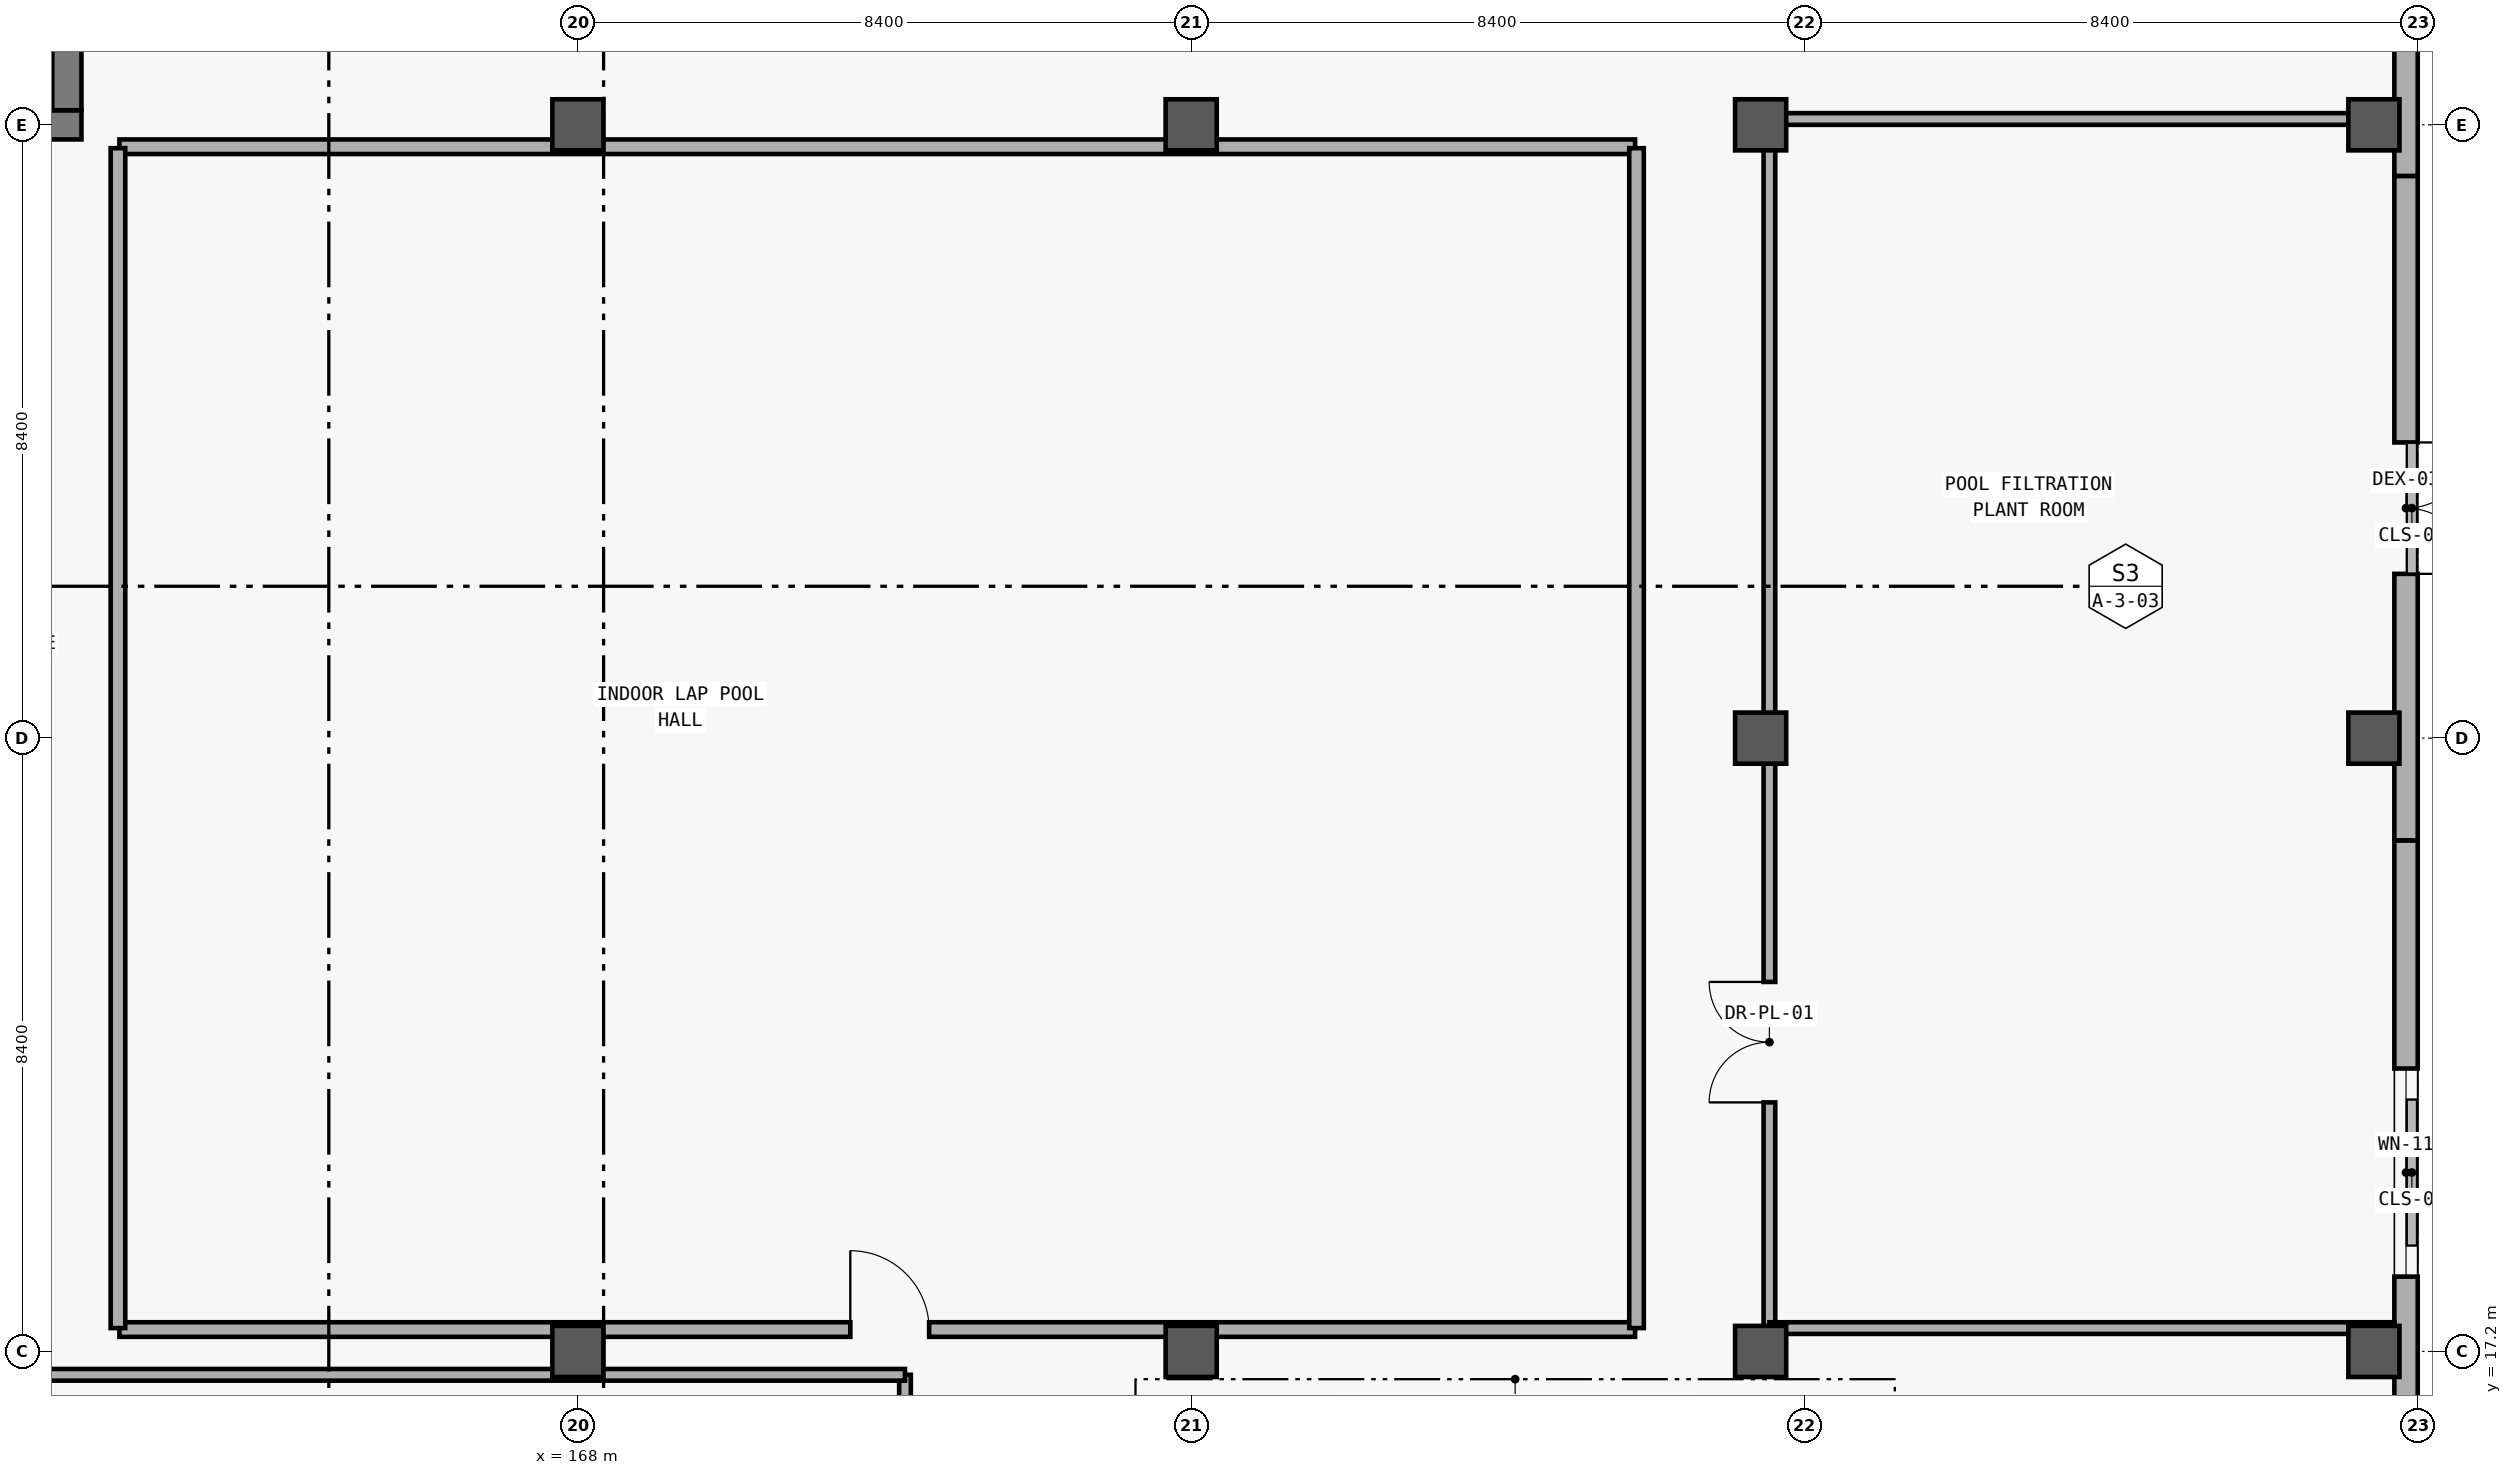
"""IFC4 building model, lengths in metres.
Left out: names, types, materials, properties, quantities, classifications, styles, units other than length and angle.
Written with IfcOpenShell. Run it as: python <this file> out.ifc"""

import sys

from ifc_helpers import new_model, si_unit, direction, frame, frame_2d, origin, origin_2d, place, context, subcontext, project, spatial, rectangle, extrude, element, fill, save


model = new_model("IFC4")
c1 = context("Model", 3, precision=1e-05, world=origin(), true_north=direction((0.0, 1.0)))
c2 = subcontext(c1, "Body", "Model", "MODEL_VIEW")
j1 = project(units=[si_unit("LENGTHUNIT", "METRE"), si_unit("PLANEANGLEUNIT", "RADIAN")], contexts=[c1])
p1 = place(None, origin())
s1 = spatial("IfcSite", under=j1, at=p1, CompositionType="ELEMENT")
p2 = place(p1, origin())
s2 = spatial("IfcBuilding", under=s1, at=p2, CompositionType="ELEMENT")
p3 = place(p2, origin())
s3 = spatial("IfcBuildingStorey", under=s2, at=p3, CompositionType="ELEMENT", Elevation=0.0)
for number, where, z_axis, x_axis in (
    (1, (168.0, 17.2, 0.0), (0.0, 0.0, 1.0), (1.0, 0.0, 0.0)),
    (2, (168.0, 34.0, 0.0), (0.0, 0.0, 1.0), (1.0, 0.0, 0.0)),
    (3, (176.4, 17.2, 0.0), (0.0, 0.0, 1.0), (1.0, 0.0, 0.0)),
    (4, (176.4, 34.0, 0.0), (0.0, 0.0, 1.0), (1.0, 0.0, 0.0)),
    (5, (184.2, 17.2, 0.0), (0.0, 0.0, 1.0), (1.0, 0.0, 0.0)),
    (6, (184.2, 25.6, 0.0), (0.0, 0.0, 1.0), (1.0, 0.0, 0.0)),
    (7, (184.2, 34.0, 0.0), (0.0, 0.0, 1.0), (1.0, 0.0, 0.0)),
    (8, (192.6, 17.2, 0.0), (0.0, 0.0, 1.0), (1.0, 0.0, 0.0)),
    (9, (192.6, 25.6, 0.0), (0.0, 0.0, 1.0), (1.0, 0.0, 0.0)),
    (10, (192.6, 34.0, 0.0), (0.0, 0.0, 1.0), (1.0, 0.0, 0.0)),
):
    element("IfcColumn", number, at=place(p3, frame(where, z_axis=z_axis, x_axis=x_axis)), inside=s3, PredefinedType="COLUMN", context=c2, shape_type="SweptSolid", body=[
        extrude(rectangle(XDim=0.7, YDim=0.7, at=origin_2d()), origin(), (0.0, 0.0, 1.0), 5.4),
    ])
p4 = place(p3, frame((193.04, 24.2, 0.0), z_axis=(0.0, 0.0, 1.0), x_axis=(0.0, -1.0, 0.0)))
e11 = element("IfcWall", 11, at=p4, inside=s3, PredefinedType="SOLIDWALL", context=c2, shape_type="SweptSolid", body=[
    extrude(rectangle(XDim=9.1, YDim=0.32, at=frame_2d((4.55, 0.0))), origin(), (0.0, 0.0, 1.0), 5.1),
])
p5 = place(p4, frame((3.125, 0.0, 0.9)))
e12 = element("IfcOpeningElement", 12, at=p5, cuts=e11, PredefinedType="OPENING", context=c2, shape_type="SweptSolid", body=[
    extrude(rectangle(XDim=2.85, YDim=1.85, at=frame_2d((1.425, 0.925))), frame((0.0, 0.17, 0.0), z_axis=(0.0, -1.0, 0.0), x_axis=(1.0, 0.0, 0.0)), (0.0, 0.0, 1.0), 0.34),
])
p6 = place(p3, frame((193.04, 33.3, 0.0), z_axis=(0.0, 0.0, 1.0), x_axis=(0.0, -1.0, 0.0)))
e13 = element("IfcWall", 13, at=p6, inside=s3, PredefinedType="SOLIDWALL", context=c2, shape_type="SweptSolid", body=[
    extrude(rectangle(XDim=9.1, YDim=0.32, at=frame_2d((4.55, 0.0))), origin(), (0.0, 0.0, 1.0), 5.1),
])
p7 = place(p6, frame((3.65, 0.0, 0.0)))
e14 = element("IfcOpeningElement", 14, at=p7, cuts=e13, PredefinedType="OPENING", context=c2, shape_type="SweptSolid", body=[
    extrude(rectangle(XDim=1.8, YDim=2.4, at=frame_2d((0.9, 1.2))), frame((0.0, 0.17, 0.0), z_axis=(0.0, -1.0, 0.0), x_axis=(1.0, 0.0, 0.0)), (0.0, 0.0, 1.0), 0.34),
])
p8 = place(p3, frame((193.04, 42.4, 0.0), z_axis=(0.0, 0.0, 1.0), x_axis=(0.0, -1.0, 0.0)))
e15 = element("IfcWall", 15, at=p8, inside=s3, PredefinedType="SOLIDWALL", context=c2, shape_type="SweptSolid", body=[
    extrude(rectangle(XDim=9.1, YDim=0.32, at=frame_2d((4.55, 0.0))), origin(), (0.0, 0.0, 1.0), 5.1),
])
p9 = place(p8, frame((2.8, 0.0, 0.9)))
e16 = element("IfcOpeningElement", 16, at=p9, cuts=e15, PredefinedType="OPENING", context=c2, shape_type="SweptSolid", body=[
    extrude(rectangle(XDim=3.5, YDim=2.0, at=frame_2d((1.75, 1.0))), frame((0.0, 0.17, 0.0), z_axis=(0.0, -1.0, 0.0), x_axis=(1.0, 0.0, 0.0)), (0.0, 0.0, 1.0), 0.34),
])
p10 = place(p3, frame((152.0, 34.0, 0.0), z_axis=(0.0, 0.0, 1.0), x_axis=(1.0, 0.0, 0.0)))
e17 = element("IfcWall", 17, at=p10, inside=s3, PredefinedType="SHEAR", context=c2, shape_type="SweptSolid", body=[
    extrude(rectangle(XDim=9.2, YDim=0.4, at=frame_2d((4.6, 0.0))), origin(), (0.0, 0.0, 1.0), 5.08),
])
p11 = place(p10, frame((1.1, 0.0, 0.0)))
e18 = element("IfcOpeningElement", 18, at=p11, cuts=e17, PredefinedType="OPENING", context=c2, shape_type="SweptSolid", body=[
    extrude(rectangle(XDim=1.1, YDim=2.2, at=frame_2d((0.55, 1.1))), frame((0.0, 0.21, 0.0), z_axis=(0.0, -1.0, 0.0), x_axis=(1.0, 0.0, 0.0)), (0.0, 0.0, 1.0), 0.42),
])
p12 = place(p3, frame((161.0, 34.2, 0.0), z_axis=(0.0, 0.0, 1.0), x_axis=(0.0, 1.0, 0.0)))
e19 = element("IfcWall", 19, at=p12, inside=s3, PredefinedType="SHEAR", context=c2, shape_type="SweptSolid", body=[
    extrude(rectangle(XDim=7.4, YDim=0.4, at=frame_2d((3.7, 0.0))), origin(), (0.0, 0.0, 1.0), 5.08),
])
p13 = place(p12, frame((5.9, 0.0, 0.0)))
e20 = element("IfcOpeningElement", 20, at=p13, cuts=e19, PredefinedType="OPENING", context=c2, shape_type="SweptSolid", body=[
    extrude(rectangle(XDim=1.15, YDim=2.2, at=frame_2d((0.575, 1.1))), frame((0.0, 0.21, 0.0), z_axis=(0.0, -1.0, 0.0), x_axis=(1.0, 0.0, 0.0)), (0.0, 0.0, 1.0), 0.42),
])
p14 = place(p3, frame((161.72, 17.5, 0.0), z_axis=(0.0, 0.0, 1.0), x_axis=(1.0, 0.0, 0.0)))
e21 = element("IfcWall", 21, at=p14, inside=s3, PredefinedType="SOLIDWALL", context=c2, shape_type="SweptSolid", body=[
    extrude(rectangle(XDim=20.76, YDim=0.2, at=frame_2d((10.38, 0.0))), origin(), (0.0, 0.0, 1.0), 4.18),
])
p15 = place(p14, frame((10.011, 0.0, 0.0)))
e22 = element("IfcOpeningElement", 22, at=p15, cuts=e21, PredefinedType="OPENING", context=c2, shape_type="SweptSolid", body=[
    extrude(rectangle(XDim=1.08, YDim=2.25, at=frame_2d((0.54, 1.125))), frame((0.0, 0.11, 0.0), z_axis=(0.0, -1.0, 0.0), x_axis=(1.0, 0.0, 0.0)), (0.0, 0.0, 1.0), 0.22),
])
p16 = place(p3, frame((172.48, 6.18, 0.0), z_axis=(0.0, 0.0, 1.0), x_axis=(0.0, 1.0, 0.0)))
e23 = element("IfcWall", 23, at=p16, inside=s3, PredefinedType="PARTITIONING", context=c2, shape_type="SweptSolid", body=[
    extrude(rectangle(XDim=10.7, YDim=0.16, at=frame_2d((5.35, 0.0))), origin(), (0.0, 0.0, 1.0), 4.18),
])
p17 = place(p16, frame((7.741, 0.0, 0.0)))
e24 = element("IfcOpeningElement", 24, at=p17, cuts=e23, PredefinedType="OPENING", context=c2, shape_type="SweptSolid", body=[
    extrude(rectangle(XDim=0.98, YDim=2.2, at=frame_2d((0.49, 1.1))), frame((0.0, 0.09, 0.0), z_axis=(0.0, -1.0, 0.0), x_axis=(1.0, 0.0, 0.0)), (0.0, 0.0, 1.0), 0.18),
])
p18 = place(p3, frame((184.32, 17.52, 0.0), z_axis=(0.0, 0.0, 1.0), x_axis=(0.0, 1.0, 0.0)))
e25 = element("IfcWall", 25, at=p18, inside=s3, PredefinedType="PARTITIONING", context=c2, shape_type="SweptSolid", body=[
    extrude(rectangle(XDim=16.56, YDim=0.16, at=frame_2d((8.28, 0.0))), origin(), (0.0, 0.0, 1.0), 4.18),
])
p19 = place(p18, frame((3.091, 0.0, 0.0)))
e26 = element("IfcOpeningElement", 26, at=p19, cuts=e25, PredefinedType="OPENING", context=c2, shape_type="SweptSolid", body=[
    extrude(rectangle(XDim=1.65, YDim=2.35, at=frame_2d((0.825, 1.175))), frame((0.0, 0.09, 0.0), z_axis=(0.0, -1.0, 0.0), x_axis=(1.0, 0.0, 0.0)), (0.0, 0.0, 1.0), 0.18),
])
p20 = place(p3, frame((161.72, 33.7, 0.0), z_axis=(0.0, 0.0, 1.0), x_axis=(1.0, 0.0, 0.0)))
e27 = element("IfcWall", 27, at=p20, inside=s3, PredefinedType="SOLIDWALL", context=c2, shape_type="SweptSolid", body=[
    extrude(rectangle(XDim=20.76, YDim=0.2, at=frame_2d((10.38, 0.0))), origin(), (0.0, 0.0, 1.0), 4.18),
])
for number, where, z_axis, x_axis in (
    (28, (161.7, 17.52, 0.0), (0.0, 0.0, 1.0), (0.0, 1.0, 0.0)),
    (29, (182.5, 17.52, 0.0), (0.0, 0.0, 1.0), (0.0, 1.0, 0.0)),
):
    element("IfcWall", number, at=place(p3, frame(where, z_axis=z_axis, x_axis=x_axis)), inside=s3, PredefinedType="SOLIDWALL", context=c2, shape_type="SweptSolid", body=[
        extrude(rectangle(XDim=16.16, YDim=0.2, at=frame_2d((8.08, 0.0))), origin(), (0.0, 0.0, 1.0), 4.18),
    ])
p21 = place(p3, frame((151.52, 16.88, 0.0), z_axis=(0.0, 0.0, 1.0), x_axis=(1.0, 0.0, 0.0)))
e30 = element("IfcWall", 30, at=p21, inside=s3, PredefinedType="PARTITIONING", context=c2, shape_type="SweptSolid", body=[
    extrude(rectangle(XDim=20.96, YDim=0.16, at=frame_2d((10.48, 0.0))), origin(), (0.0, 0.0, 1.0), 4.18),
])
for number, where, z_axis, x_axis in (
    (31, (184.32, 17.52, 0.0), (0.0, 0.0, 1.0), (1.0, 0.0, 0.0)),
    (32, (184.32, 34.08, 0.0), (0.0, 0.0, 1.0), (1.0, 0.0, 0.0)),
):
    element("IfcWall", number, at=place(p3, frame(where, z_axis=z_axis, x_axis=x_axis)), inside=s3, PredefinedType="PARTITIONING", context=c2, shape_type="SweptSolid", body=[
        extrude(rectangle(XDim=8.56, YDim=0.16, at=frame_2d((4.28, 0.0))), origin(), (0.0, 0.0, 1.0), 4.18),
    ])
p22 = place(p5, origin())
e33 = element("IfcWindow", 33, at=p22, inside=s3, PartitioningType="SINGLE_PANEL", PredefinedType="WINDOW", context=c2, shape_type="SweptSolid", body=[
    extrude(rectangle(XDim=2.85, YDim=1.85, at=frame_2d((1.425, 0.925))), frame((0.0, 0.03, 0.0), z_axis=(0.0, -1.0, 0.0), x_axis=(1.0, 0.0, 0.0)), (0.0, 0.0, 1.0), 0.06),
])
fill(e12, e33)
p23 = place(p7, origin())
e34 = element("IfcDoor", 34, at=p23, inside=s3, OperationType="DOUBLE_DOOR_SINGLE_SWING", PredefinedType="DOOR", context=c2, shape_type="SweptSolid", body=[
    extrude(rectangle(XDim=1.8, YDim=2.4, at=frame_2d((0.9, 1.2))), frame((0.0, 0.025, 0.0), z_axis=(0.0, -1.0, 0.0), x_axis=(1.0, 0.0, 0.0)), (0.0, 0.0, 1.0), 0.05),
])
fill(e14, e34)
p24 = place(p15, origin())
e35 = element("IfcDoor", 35, at=p24, inside=s3, OperationType="SINGLE_SWING_LEFT", PredefinedType="DOOR", context=c2, shape_type="SweptSolid", body=[
    extrude(rectangle(XDim=1.08, YDim=2.25, at=frame_2d((0.54, 1.125))), frame((0.0, 0.025, 0.0), z_axis=(0.0, -1.0, 0.0), x_axis=(1.0, 0.0, 0.0)), (0.0, 0.0, 1.0), 0.05),
])
fill(e22, e35)
p25 = place(p19, origin())
e36 = element("IfcDoor", 36, at=p25, inside=s3, OperationType="DOUBLE_DOOR_SINGLE_SWING", PredefinedType="DOOR", context=c2, shape_type="SweptSolid", body=[
    extrude(rectangle(XDim=1.65, YDim=2.35, at=frame_2d((0.825, 1.175))), frame((0.0, 0.025, 0.0), z_axis=(0.0, -1.0, 0.0), x_axis=(1.0, 0.0, 0.0)), (0.0, 0.0, 1.0), 0.05),
])
fill(e26, e36)
save(model, sys.argv[1])
